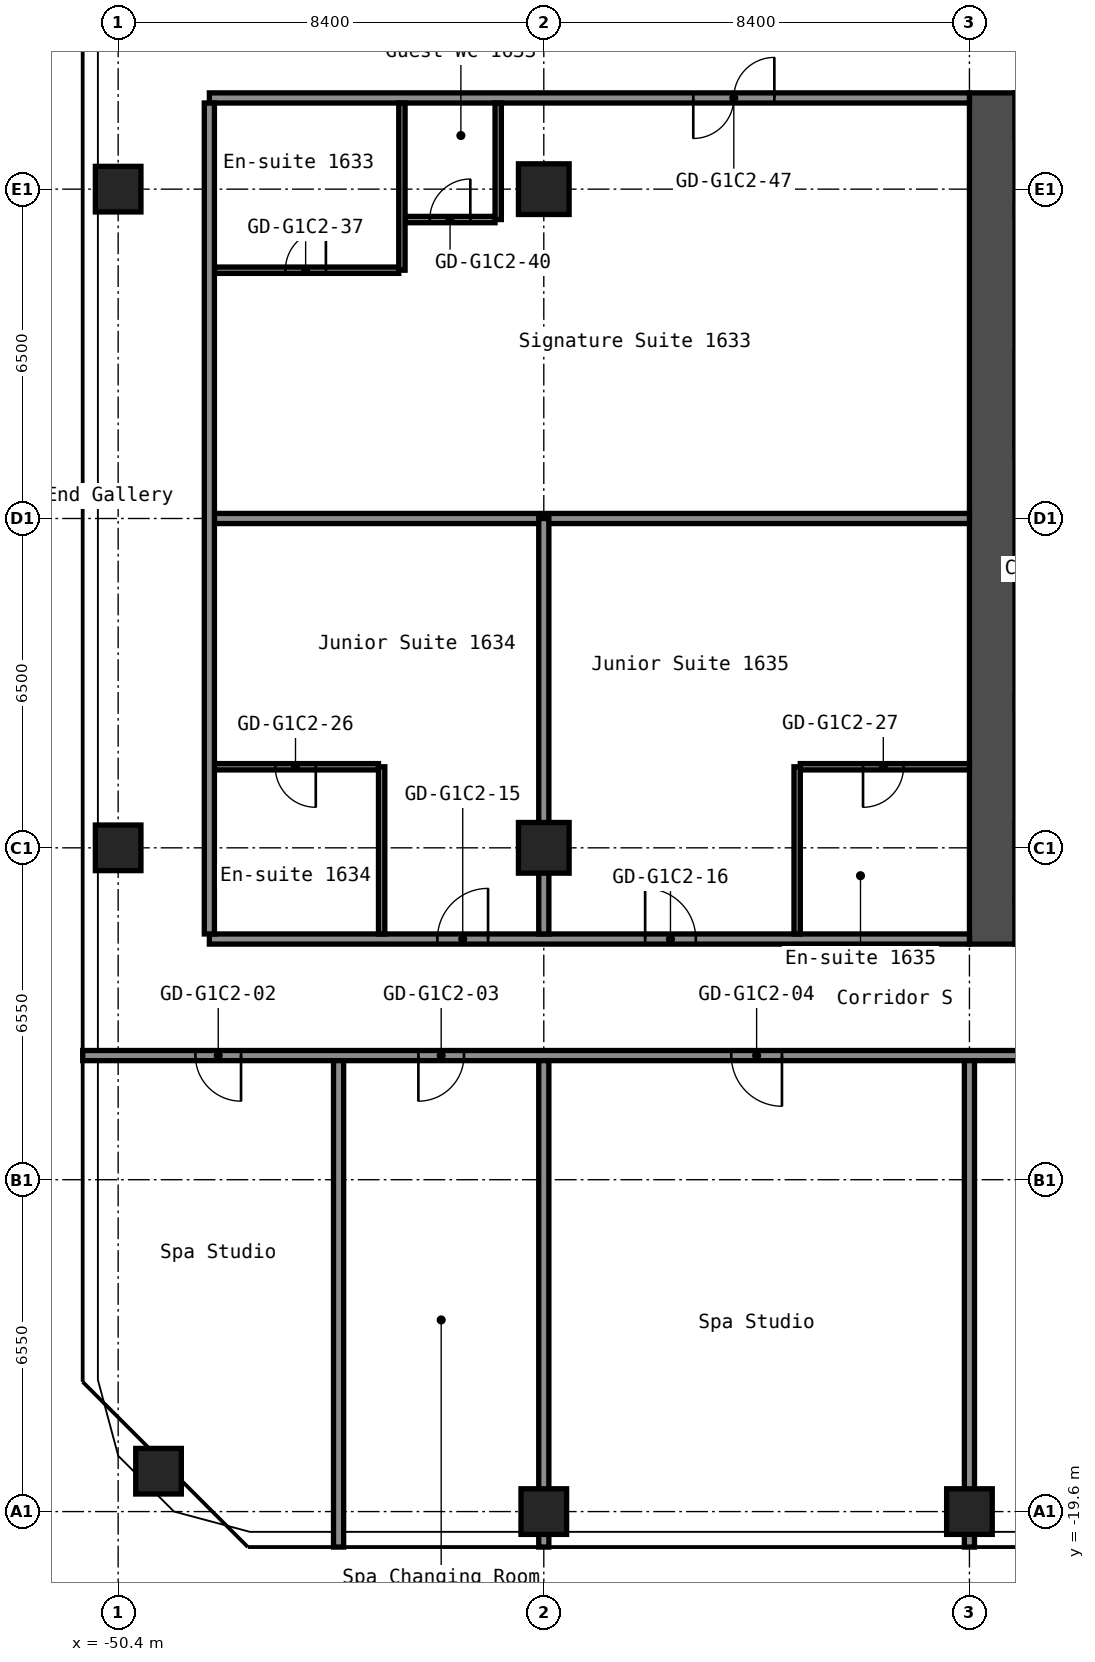
"""IFC4 building model, lengths in metres.
Left out: names, types, materials, properties, quantities, classifications, styles, units other than length and angle.
Written with IfcOpenShell. Run it as: python <this file> out.ifc"""

import sys

from ifc_helpers import new_model, si_unit, direction, frame, frame_2d, origin, origin_2d, place, context, subcontext, project, spatial, rectangle, hollow_rectangle, extrude, element, fill, save


model = new_model("IFC4")
c1 = context("Model", 3, precision=1e-05, world=origin(), true_north=direction((0.0, 1.0)))
c2 = subcontext(c1, "Body", "Model", "MODEL_VIEW")
j1 = project(units=[si_unit("LENGTHUNIT", "METRE"), si_unit("PLANEANGLEUNIT", "RADIAN")], contexts=[c1])
p1 = place(None, origin())
s1 = spatial("IfcSite", under=j1, at=p1, CompositionType="ELEMENT")
p2 = place(p1, origin())
s2 = spatial("IfcBuilding", under=s1, at=p2, CompositionType="ELEMENT")
p3 = place(p2, frame((0.0, 0.0, 58.2)))
s3 = spatial("IfcBuildingStorey", under=s2, at=p3, CompositionType="ELEMENT", Elevation=58.2)
for number, where, z_axis, x_axis in (
    (1, (-49.603, -18.803, 0.0), (0.0, 0.0, 1.0), (1.0, 0.0, 0.0)),
    (2, (-50.4, -6.5, 0.0), (0.0, 0.0, 1.0), (1.0, 0.0, 0.0)),
    (3, (-50.4, 6.5, 0.0), (0.0, 0.0, 1.0), (1.0, 0.0, 0.0)),
    (4, (-42.0, -19.6, 0.0), (0.0, 0.0, 1.0), (1.0, 0.0, 0.0)),
):
    element("IfcColumn", number, at=place(p3, frame(where, z_axis=z_axis, x_axis=x_axis)), inside=s3, PredefinedType="COLUMN", context=c2, shape_type="SweptSolid", body=[
        extrude(hollow_rectangle(XDim=0.9, YDim=0.9, WallThickness=0.036, at=origin_2d()), origin(), (0.0, 0.0, 1.0), 2.8),
    ])
for number, where, z_axis, x_axis in (
    (5, (-42.0, -6.5, 0.0), (0.0, 0.0, 1.0), (1.0, 0.0, 0.0)),
    (6, (-42.0, 6.5, 0.0), (0.0, 0.0, 1.0), (1.0, 0.0, 0.0)),
):
    element("IfcColumn", number, at=place(p3, frame(where, z_axis=z_axis, x_axis=x_axis)), inside=s3, PredefinedType="COLUMN", context=c2, shape_type="SweptSolid", body=[
        extrude(hollow_rectangle(XDim=1.0, YDim=1.0, WallThickness=0.04, at=origin_2d()), origin(), (0.0, 0.0, 1.0), 2.8),
    ])
p4 = place(p3, frame((-33.6, -19.6, 0.0), z_axis=(0.0, 0.0, 1.0), x_axis=(1.0, 0.0, 0.0)))
e7 = element("IfcColumn", 7, at=p4, inside=s3, PredefinedType="COLUMN", context=c2, shape_type="SweptSolid", body=[
    extrude(hollow_rectangle(XDim=0.9, YDim=0.9, WallThickness=0.036, at=origin_2d()), origin(), (0.0, 0.0, 1.0), 2.8),
])
p5 = place(p3, frame((-33.15, -8.4, 0.0), z_axis=(0.0, 0.0, 1.0), x_axis=(0.0, 1.0, 0.0)))
e8 = element("IfcWall", 8, at=p5, inside=s3, PredefinedType="SHEAR", context=c2, shape_type="SweptSolid", body=[
    extrude(rectangle(XDim=16.8, YDim=0.9, at=frame_2d((8.4, 0.0))), origin(), (0.0, 0.0, 1.0), 2.8),
])
p6 = place(p3, frame((-32.7, 1.325, 0.0), z_axis=(0.0, 0.0, 1.0), x_axis=(1.0, 0.0, 0.0)))
e9 = element("IfcWall", 9, at=p6, inside=s3, PredefinedType="SHEAR", context=c2, shape_type="SweptSolid", body=[
    extrude(rectangle(XDim=5.05, YDim=0.25, at=frame_2d((2.525, 0.0))), origin(), (0.0, 0.0, 1.0), 2.8),
])
p7 = place(p6, frame((3.3, 0.0, 0.0)))
e10 = element("IfcOpeningElement", 10, at=p7, cuts=e9, PredefinedType="OPENING", context=c2, shape_type="SweptSolid", body=[
    extrude(rectangle(XDim=1.2, YDim=2.1, at=frame_2d((0.6, 1.05))), frame((0.0, 0.135, 0.0), z_axis=(0.0, -1.0, 0.0), x_axis=(1.0, 0.0, 0.0)), (0.0, 0.0, 1.0), 0.27),
])
p8 = place(p3, frame((-32.7, -3.625, 0.0), z_axis=(0.0, 0.0, 1.0), x_axis=(1.0, 0.0, 0.0)))
e11 = element("IfcWall", 11, at=p8, inside=s3, PredefinedType="SHEAR", context=c2, shape_type="SweptSolid", body=[
    extrude(rectangle(XDim=4.55, YDim=0.25, at=frame_2d((2.275, 0.0))), origin(), (0.0, 0.0, 1.0), 2.8),
])
p9 = place(p8, frame((2.85, 0.0, 0.0)))
e12 = element("IfcOpeningElement", 12, at=p9, cuts=e11, PredefinedType="OPENING", context=c2, shape_type="SweptSolid", body=[
    extrude(rectangle(XDim=1.1, YDim=2.1, at=frame_2d((0.55, 1.05))), frame((0.0, 0.135, 0.0), z_axis=(0.0, -1.0, 0.0), x_axis=(1.0, 0.0, 0.0)), (0.0, 0.0, 1.0), 0.27),
])
p10 = place(p8, frame((0.6, 0.0, 0.0)))
e13 = element("IfcOpeningElement", 13, at=p10, cuts=e11, PredefinedType="OPENING", context=c2, shape_type="SweptSolid", body=[
    extrude(rectangle(XDim=1.1, YDim=2.1, at=frame_2d((0.55, 1.05))), frame((0.0, 0.135, 0.0), z_axis=(0.0, -1.0, 0.0), x_axis=(1.0, 0.0, 0.0)), (0.0, 0.0, 1.0), 0.27),
])
p11 = place(p3, frame((-32.7, -6.75, 0.0), z_axis=(0.0, 0.0, 1.0), x_axis=(1.0, 0.0, 0.0)))
e14 = element("IfcWall", 14, at=p11, inside=s3, PredefinedType="SHEAR", context=c2, shape_type="SweptSolid", body=[
    extrude(rectangle(XDim=4.55, YDim=1.5, at=frame_2d((2.275, 0.0))), origin(), (0.0, 0.0, 1.0), 2.8),
])
p12 = place(p3, frame((-51.1, -10.6, 0.0), z_axis=(0.0, 0.0, 1.0), x_axis=(1.0, 0.0, 0.0)))
e15 = element("IfcWall", 15, at=p12, inside=s3, PredefinedType="PARTITIONING", context=c2, shape_type="SweptSolid", body=[
    extrude(rectangle(XDim=34.3, YDim=0.2, at=frame_2d((17.15, 0.0))), origin(), (0.0, 0.0, 1.0), 2.8),
])
p13 = place(p12, frame((2.225, 0.0, 0.0)))
e16 = element("IfcOpeningElement", 16, at=p13, cuts=e15, PredefinedType="OPENING", context=c2, shape_type="SweptSolid", body=[
    extrude(rectangle(XDim=0.9, YDim=2.1, at=frame_2d((0.45, 1.05))), frame((0.0, 0.11, 0.0), z_axis=(0.0, -1.0, 0.0), x_axis=(1.0, 0.0, 0.0)), (0.0, 0.0, 1.0), 0.22),
])
p14 = place(p12, frame((6.625, 0.0, 0.0)))
e17 = element("IfcOpeningElement", 17, at=p14, cuts=e15, PredefinedType="OPENING", context=c2, shape_type="SweptSolid", body=[
    extrude(rectangle(XDim=0.9, YDim=2.1, at=frame_2d((0.45, 1.05))), frame((0.0, 0.11, 0.0), z_axis=(0.0, -1.0, 0.0), x_axis=(1.0, 0.0, 0.0)), (0.0, 0.0, 1.0), 0.22),
])
p15 = place(p12, frame((12.8, 0.0, 0.0)))
e18 = element("IfcOpeningElement", 18, at=p15, cuts=e15, PredefinedType="OPENING", context=c2, shape_type="SweptSolid", body=[
    extrude(rectangle(XDim=1.0, YDim=2.1, at=frame_2d((0.5, 1.05))), frame((0.0, 0.11, 0.0), z_axis=(0.0, -1.0, 0.0), x_axis=(1.0, 0.0, 0.0)), (0.0, 0.0, 1.0), 0.22),
])
p16 = place(p12, frame((21.2, 0.0, 0.0)))
e19 = element("IfcOpeningElement", 19, at=p16, cuts=e15, PredefinedType="OPENING", context=c2, shape_type="SweptSolid", body=[
    extrude(rectangle(XDim=1.0, YDim=2.1, at=frame_2d((0.5, 1.05))), frame((0.0, 0.11, 0.0), z_axis=(0.0, -1.0, 0.0), x_axis=(1.0, 0.0, 0.0)), (0.0, 0.0, 1.0), 0.22),
])
p17 = place(p12, frame((27.885, 0.0, 0.0)))
e20 = element("IfcOpeningElement", 20, at=p17, cuts=e15, PredefinedType="OPENING", context=c2, shape_type="SweptSolid", body=[
    extrude(rectangle(XDim=0.9, YDim=2.1, at=frame_2d((0.45, 1.05))), frame((0.0, 0.11, 0.0), z_axis=(0.0, -1.0, 0.0), x_axis=(1.0, 0.0, 0.0)), (0.0, 0.0, 1.0), 0.22),
])
p18 = place(p12, frame((32.085, 0.0, 0.0)))
e21 = element("IfcOpeningElement", 21, at=p18, cuts=e15, PredefinedType="OPENING", context=c2, shape_type="SweptSolid", body=[
    extrude(rectangle(XDim=0.9, YDim=2.1, at=frame_2d((0.45, 1.05))), frame((0.0, 0.11, 0.0), z_axis=(0.0, -1.0, 0.0), x_axis=(1.0, 0.0, 0.0)), (0.0, 0.0, 1.0), 0.22),
])
p19 = place(p3, frame((-48.6, -8.3, 0.0), z_axis=(0.0, 0.0, 1.0), x_axis=(1.0, 0.0, 0.0)))
e22 = element("IfcWall", 22, at=p19, inside=s3, PredefinedType="PARTITIONING", context=c2, shape_type="SweptSolid", body=[
    extrude(rectangle(XDim=15.0, YDim=0.2, at=frame_2d((7.5, 0.0))), origin(), (0.0, 0.0, 1.0), 2.8),
])
p20 = place(p19, frame((4.5, 0.0, 0.0)))
e23 = element("IfcOpeningElement", 23, at=p20, cuts=e22, PredefinedType="OPENING", context=c2, shape_type="SweptSolid", body=[
    extrude(rectangle(XDim=1.0, YDim=2.1, at=frame_2d((0.5, 1.05))), frame((0.0, 0.11, 0.0), z_axis=(0.0, -1.0, 0.0), x_axis=(1.0, 0.0, 0.0)), (0.0, 0.0, 1.0), 0.22),
])
p21 = place(p19, frame((8.6, 0.0, 0.0)))
e24 = element("IfcOpeningElement", 24, at=p21, cuts=e22, PredefinedType="OPENING", context=c2, shape_type="SweptSolid", body=[
    extrude(rectangle(XDim=1.0, YDim=2.1, at=frame_2d((0.5, 1.05))), frame((0.0, 0.11, 0.0), z_axis=(0.0, -1.0, 0.0), x_axis=(1.0, 0.0, 0.0)), (0.0, 0.0, 1.0), 0.22),
])
p22 = place(p3, frame((-48.5, -4.9, 0.0), z_axis=(0.0, 0.0, 1.0), x_axis=(1.0, 0.0, 0.0)))
e25 = element("IfcWall", 25, at=p22, inside=s3, PredefinedType="PARTITIONING", context=c2, shape_type="SweptSolid", body=[
    extrude(rectangle(XDim=3.238, YDim=0.125, at=frame_2d((1.619, 0.0))), origin(), (0.0, 0.0, 1.0), 2.8),
])
p23 = place(p22, frame((1.2, 0.0, 0.0)))
e26 = element("IfcOpeningElement", 26, at=p23, cuts=e25, PredefinedType="OPENING", context=c2, shape_type="SweptSolid", body=[
    extrude(rectangle(XDim=0.8, YDim=2.1, at=frame_2d((0.4, 1.05))), frame((0.0, 0.073, 0.0), z_axis=(0.0, -1.0, 0.0), x_axis=(1.0, 0.0, 0.0)), (0.0, 0.0, 1.0), 0.145),
])
p24 = place(p3, frame((-36.938, -4.9, 0.0), z_axis=(0.0, 0.0, 1.0), x_axis=(1.0, 0.0, 0.0)))
e27 = element("IfcWall", 27, at=p24, inside=s3, PredefinedType="PARTITIONING", context=c2, shape_type="SweptSolid", body=[
    extrude(rectangle(XDim=3.337, YDim=0.125, at=frame_2d((1.669, 0.0))), origin(), (0.0, 0.0, 1.0), 2.8),
])
p25 = place(p24, frame((1.238, 0.0, 0.0)))
e28 = element("IfcOpeningElement", 28, at=p25, cuts=e27, PredefinedType="OPENING", context=c2, shape_type="SweptSolid", body=[
    extrude(rectangle(XDim=0.8, YDim=2.1, at=frame_2d((0.4, 1.05))), frame((0.0, 0.073, 0.0), z_axis=(0.0, -1.0, 0.0), x_axis=(1.0, 0.0, 0.0)), (0.0, 0.0, 1.0), 0.145),
])
p26 = place(p3, frame((-48.5, 0.0, 0.0), z_axis=(0.0, 0.0, 1.0), x_axis=(1.0, 0.0, 0.0)))
e29 = element("IfcWall", 29, at=p26, inside=s3, PredefinedType="PARTITIONING", context=c2, shape_type="SweptSolid", body=[
    extrude(rectangle(XDim=14.9, YDim=0.2, at=frame_2d((7.45, 0.0))), origin(), (0.0, 0.0, 1.0), 2.8),
])
p27 = place(p3, frame((-48.5, 4.9, 0.0), z_axis=(0.0, 0.0, 1.0), x_axis=(1.0, 0.0, 0.0)))
e30 = element("IfcWall", 30, at=p27, inside=s3, PredefinedType="PARTITIONING", context=c2, shape_type="SweptSolid", body=[
    extrude(rectangle(XDim=3.637, YDim=0.125, at=frame_2d((1.819, 0.0))), origin(), (0.0, 0.0, 1.0), 2.8),
])
p28 = place(p27, frame((1.4, 0.0, 0.0)))
e31 = element("IfcOpeningElement", 31, at=p28, cuts=e30, PredefinedType="OPENING", context=c2, shape_type="SweptSolid", body=[
    extrude(rectangle(XDim=0.8, YDim=2.1, at=frame_2d((0.4, 1.05))), frame((0.0, 0.073, 0.0), z_axis=(0.0, -1.0, 0.0), x_axis=(1.0, 0.0, 0.0)), (0.0, 0.0, 1.0), 0.145),
])
p29 = place(p3, frame((-44.738, 5.9, 0.0), z_axis=(0.0, 0.0, 1.0), x_axis=(1.0, 0.0, 0.0)))
e32 = element("IfcWall", 32, at=p29, inside=s3, PredefinedType="PARTITIONING", context=c2, shape_type="SweptSolid", body=[
    extrude(rectangle(XDim=1.775, YDim=0.125, at=frame_2d((0.888, 0.0))), origin(), (0.0, 0.0, 1.0), 2.8),
])
p30 = place(p29, frame((0.488, 0.0, 0.0)))
e33 = element("IfcOpeningElement", 33, at=p30, cuts=e32, PredefinedType="OPENING", context=c2, shape_type="SweptSolid", body=[
    extrude(rectangle(XDim=0.8, YDim=2.1, at=frame_2d((0.4, 1.05))), frame((0.0, 0.073, 0.0), z_axis=(0.0, -1.0, 0.0), x_axis=(1.0, 0.0, 0.0)), (0.0, 0.0, 1.0), 0.145),
])
p31 = place(p3, frame((-48.6, 8.3, 0.0), z_axis=(0.0, 0.0, 1.0), x_axis=(1.0, 0.0, 0.0)))
e34 = element("IfcWall", 34, at=p31, inside=s3, PredefinedType="PARTITIONING", context=c2, shape_type="SweptSolid", body=[
    extrude(rectangle(XDim=15.0, YDim=0.2, at=frame_2d((7.5, 0.0))), origin(), (0.0, 0.0, 1.0), 2.8),
])
p32 = place(p31, frame((9.55, 0.0, 0.0)))
e35 = element("IfcOpeningElement", 35, at=p32, cuts=e34, PredefinedType="OPENING", context=c2, shape_type="SweptSolid", body=[
    extrude(rectangle(XDim=1.6, YDim=2.1, at=frame_2d((0.8, 1.05))), frame((0.0, 0.11, 0.0), z_axis=(0.0, -1.0, 0.0), x_axis=(1.0, 0.0, 0.0)), (0.0, 0.0, 1.0), 0.22),
])
p33 = place(p3, frame((-48.6, -8.2, 0.0), z_axis=(0.0, 0.0, 1.0), x_axis=(0.0, 1.0, 0.0)))
e36 = element("IfcWall", 36, at=p33, inside=s3, PredefinedType="PARTITIONING", context=c2, shape_type="SweptSolid", body=[
    extrude(rectangle(XDim=16.4, YDim=0.2, at=frame_2d((8.2, 0.0))), origin(), (0.0, 0.0, 1.0), 2.8),
])
p34 = place(p3, frame((-46.05, -20.3, 0.0), z_axis=(0.0, 0.0, 1.0), x_axis=(0.0, 1.0, 0.0)))
e37 = element("IfcWall", 37, at=p34, inside=s3, PredefinedType="PARTITIONING", context=c2, shape_type="SweptSolid", body=[
    extrude(rectangle(XDim=9.6, YDim=0.2, at=frame_2d((4.8, 0.0))), origin(), (0.0, 0.0, 1.0), 2.8),
])
for number, where, z_axis, x_axis in (
    (38, (-45.2, -8.2, 0.0), (0.0, 0.0, 1.0), (0.0, 1.0, 0.0)),
    (39, (-44.8, 4.9, 0.0), (0.0, 0.0, 1.0), (0.0, 1.0, 0.0)),
):
    element("IfcWall", number, at=place(p3, frame(where, z_axis=z_axis, x_axis=x_axis)), inside=s3, PredefinedType="PARTITIONING", context=c2, shape_type="SweptSolid", body=[
        extrude(rectangle(XDim=3.3, YDim=0.125, at=frame_2d((1.65, 0.0))), origin(), (0.0, 0.0, 1.0), 2.8),
    ])
p35 = place(p3, frame((-42.9, 5.9, 0.0), z_axis=(0.0, 0.0, 1.0), x_axis=(0.0, 1.0, 0.0)))
e40 = element("IfcWall", 40, at=p35, inside=s3, PredefinedType="PARTITIONING", context=c2, shape_type="SweptSolid", body=[
    extrude(rectangle(XDim=2.3, YDim=0.125, at=frame_2d((1.15, 0.0))), origin(), (0.0, 0.0, 1.0), 2.8),
])
p36 = place(p3, frame((-42.0, -20.3, 0.0), z_axis=(0.0, 0.0, 1.0), x_axis=(0.0, 1.0, 0.0)))
e41 = element("IfcWall", 41, at=p36, inside=s3, PredefinedType="PARTITIONING", context=c2, shape_type="SweptSolid", body=[
    extrude(rectangle(XDim=9.6, YDim=0.2, at=frame_2d((4.8, 0.0))), origin(), (0.0, 0.0, 1.0), 2.8),
])
p37 = place(p3, frame((-42.0, -8.2, 0.0), z_axis=(0.0, 0.0, 1.0), x_axis=(0.0, 1.0, 0.0)))
e42 = element("IfcWall", 42, at=p37, inside=s3, PredefinedType="PARTITIONING", context=c2, shape_type="SweptSolid", body=[
    extrude(rectangle(XDim=8.2, YDim=0.2, at=frame_2d((4.1, 0.0))), origin(), (0.0, 0.0, 1.0), 2.8),
])
p38 = place(p3, frame((-37.0, -8.2, 0.0), z_axis=(0.0, 0.0, 1.0), x_axis=(0.0, 1.0, 0.0)))
e43 = element("IfcWall", 43, at=p38, inside=s3, PredefinedType="PARTITIONING", context=c2, shape_type="SweptSolid", body=[
    extrude(rectangle(XDim=3.3, YDim=0.125, at=frame_2d((1.65, 0.0))), origin(), (0.0, 0.0, 1.0), 2.8),
])
p39 = place(p3, frame((-33.6, -20.3, 0.0), z_axis=(0.0, 0.0, 1.0), x_axis=(0.0, 1.0, 0.0)))
e44 = element("IfcWall", 44, at=p39, inside=s3, PredefinedType="PARTITIONING", context=c2, shape_type="SweptSolid", body=[
    extrude(rectangle(XDim=9.6, YDim=0.2, at=frame_2d((4.8, 0.0))), origin(), (0.0, 0.0, 1.0), 2.8),
])
p40 = place(p13, origin())
e45 = element("IfcDoor", 45, at=p40, inside=s3, OperationType="SINGLE_SWING_RIGHT", PredefinedType="DOOR", context=c2, shape_type="SweptSolid", body=[
    extrude(rectangle(XDim=0.9, YDim=2.1, at=frame_2d((0.45, 1.05))), frame((0.0, 0.025, 0.0), z_axis=(0.0, -1.0, 0.0), x_axis=(1.0, 0.0, 0.0)), (0.0, 0.0, 1.0), 0.05),
])
fill(e16, e45)
p41 = place(p14, origin())
e46 = element("IfcDoor", 46, at=p41, inside=s3, OperationType="SINGLE_SWING_LEFT", PredefinedType="DOOR", context=c2, shape_type="SweptSolid", body=[
    extrude(rectangle(XDim=0.9, YDim=2.1, at=frame_2d((0.45, 1.05))), frame((0.0, 0.025, 0.0), z_axis=(0.0, -1.0, 0.0), x_axis=(1.0, 0.0, 0.0)), (0.0, 0.0, 1.0), 0.05),
])
fill(e17, e46)
p42 = place(p15, origin())
e47 = element("IfcDoor", 47, at=p42, inside=s3, OperationType="SINGLE_SWING_RIGHT", PredefinedType="DOOR", context=c2, shape_type="SweptSolid", body=[
    extrude(rectangle(XDim=1.0, YDim=2.1, at=frame_2d((0.5, 1.05))), frame((0.0, 0.025, 0.0), z_axis=(0.0, -1.0, 0.0), x_axis=(1.0, 0.0, 0.0)), (0.0, 0.0, 1.0), 0.05),
])
fill(e18, e47)
p43 = place(p20, origin())
e48 = element("IfcDoor", 48, at=p43, inside=s3, OperationType="SINGLE_SWING_LEFT", PredefinedType="DOOR", context=c2, shape_type="SweptSolid", body=[
    extrude(rectangle(XDim=1.0, YDim=2.1, at=frame_2d((0.5, 1.05))), frame((0.0, 0.025, 0.0), z_axis=(0.0, -1.0, 0.0), x_axis=(1.0, 0.0, 0.0)), (0.0, 0.0, 1.0), 0.05),
])
fill(e23, e48)
p44 = place(p21, origin())
e49 = element("IfcDoor", 49, at=p44, inside=s3, OperationType="SINGLE_SWING_RIGHT", PredefinedType="DOOR", context=c2, shape_type="SweptSolid", body=[
    extrude(rectangle(XDim=1.0, YDim=2.1, at=frame_2d((0.5, 1.05))), frame((0.0, 0.025, 0.0), z_axis=(0.0, -1.0, 0.0), x_axis=(1.0, 0.0, 0.0)), (0.0, 0.0, 1.0), 0.05),
])
fill(e24, e49)
p45 = place(p23, origin())
e50 = element("IfcDoor", 50, at=p45, inside=s3, OperationType="SINGLE_SWING_RIGHT", PredefinedType="DOOR", context=c2, shape_type="SweptSolid", body=[
    extrude(rectangle(XDim=0.8, YDim=2.1, at=frame_2d((0.4, 1.05))), frame((0.0, 0.025, 0.0), z_axis=(0.0, -1.0, 0.0), x_axis=(1.0, 0.0, 0.0)), (0.0, 0.0, 1.0), 0.05),
])
fill(e26, e50)
p46 = place(p25, origin())
e51 = element("IfcDoor", 51, at=p46, inside=s3, OperationType="SINGLE_SWING_LEFT", PredefinedType="DOOR", context=c2, shape_type="SweptSolid", body=[
    extrude(rectangle(XDim=0.8, YDim=2.1, at=frame_2d((0.4, 1.05))), frame((0.0, 0.025, 0.0), z_axis=(0.0, -1.0, 0.0), x_axis=(1.0, 0.0, 0.0)), (0.0, 0.0, 1.0), 0.05),
])
fill(e28, e51)
p47 = place(p28, origin())
e52 = element("IfcDoor", 52, at=p47, inside=s3, OperationType="SINGLE_SWING_LEFT", PredefinedType="DOOR", context=c2, shape_type="SweptSolid", body=[
    extrude(rectangle(XDim=0.8, YDim=2.1, at=frame_2d((0.4, 1.05))), frame((0.0, 0.025, 0.0), z_axis=(0.0, -1.0, 0.0), x_axis=(1.0, 0.0, 0.0)), (0.0, 0.0, 1.0), 0.05),
])
fill(e31, e52)
p48 = place(p30, origin())
e53 = element("IfcDoor", 53, at=p48, inside=s3, OperationType="SINGLE_SWING_LEFT", PredefinedType="DOOR", context=c2, shape_type="SweptSolid", body=[
    extrude(rectangle(XDim=0.8, YDim=2.1, at=frame_2d((0.4, 1.05))), frame((0.0, 0.025, 0.0), z_axis=(0.0, -1.0, 0.0), x_axis=(1.0, 0.0, 0.0)), (0.0, 0.0, 1.0), 0.05),
])
fill(e33, e53)
p49 = place(p32, origin())
e54 = element("IfcDoor", 54, at=p49, inside=s3, OperationType="DOUBLE_DOOR_SINGLE_SWING", PredefinedType="DOOR", context=c2, shape_type="SweptSolid", body=[
    extrude(rectangle(XDim=1.6, YDim=2.1, at=frame_2d((0.8, 1.05))), frame((0.0, 0.025, 0.0), z_axis=(0.0, -1.0, 0.0), x_axis=(1.0, 0.0, 0.0)), (0.0, 0.0, 1.0), 0.05),
])
fill(e35, e54)
save(model, sys.argv[1])
